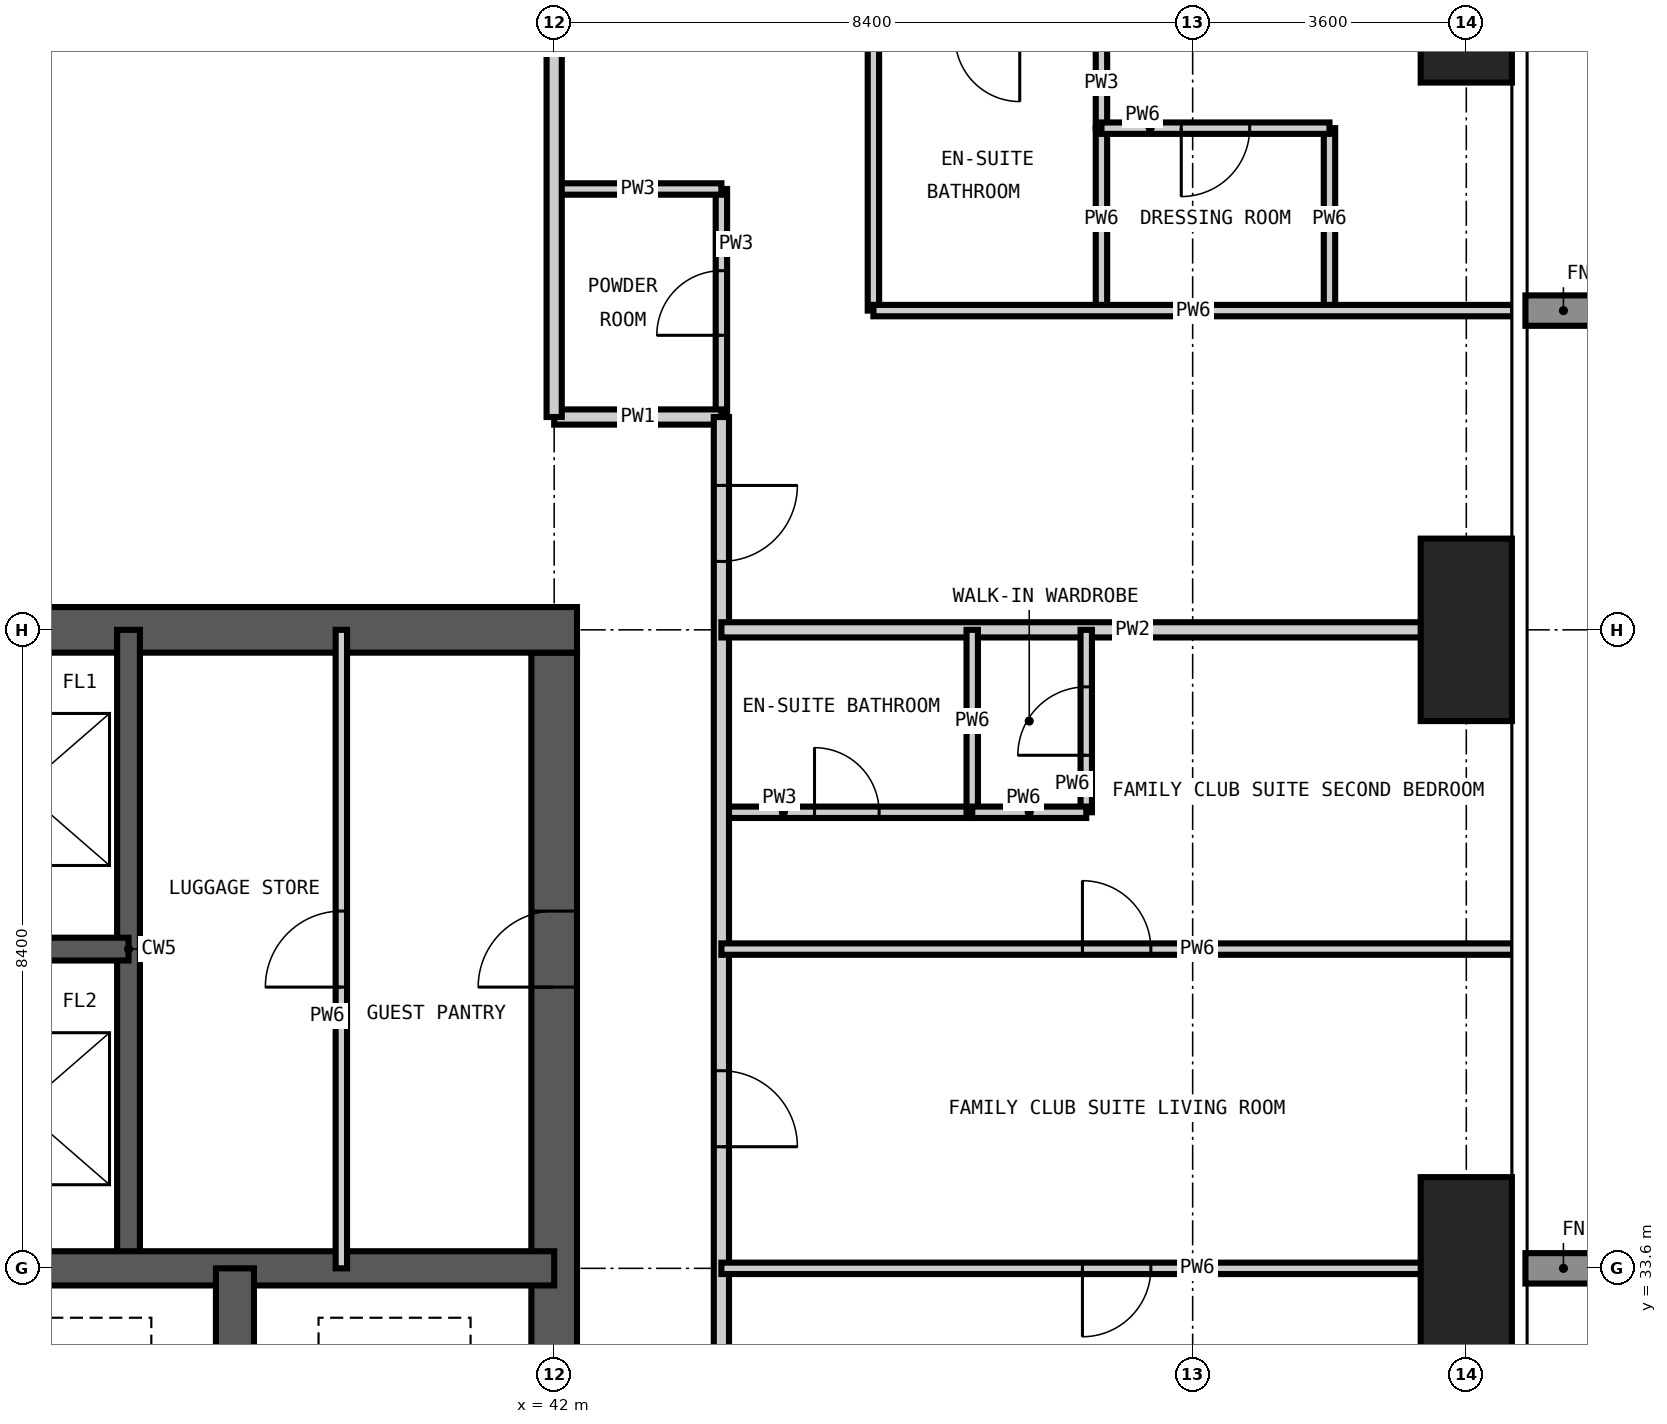
"""IFC4 building model, lengths in metres.
Left out: names, types, materials, properties, quantities, classifications, styles, units other than length and angle.
Written with IfcOpenShell. Run it as: python <this file> out.ifc"""

import sys

from ifc_helpers import new_model, si_unit, direction, frame, frame_2d, origin, origin_2d, place, context, subcontext, project, spatial, rectangle, extrude, element, fill, save


model = new_model("IFC4")
c1 = context("Model", 3, precision=1e-05, world=origin(), true_north=direction((0.0, 1.0)))
c2 = subcontext(c1, "Body", "Model", "MODEL_VIEW")
j1 = project(units=[si_unit("LENGTHUNIT", "METRE"), si_unit("PLANEANGLEUNIT", "RADIAN")], contexts=[c1])
p1 = place(None, origin())
s1 = spatial("IfcSite", under=j1, at=p1, CompositionType="ELEMENT")
p2 = place(p1, origin())
s2 = spatial("IfcBuilding", under=s1, at=p2, CompositionType="ELEMENT")
p3 = place(p2, frame((0.0, 0.0, 198.6)))
s3 = spatial("IfcBuildingStorey", under=s2, at=p3, CompositionType="ELEMENT", Elevation=198.6)
for number, where, z_axis, x_axis in (
    (1, (54.0, 33.6, -0.35), (0.0, 0.0, 1.0), (1.0, 0.0, 0.0)),
    (2, (54.0, 42.0, -0.35), (0.0, 0.0, 1.0), (1.0, 0.0, 0.0)),
    (3, (54.0, 50.4, -0.35), (0.0, 0.0, 1.0), (1.0, 0.0, 0.0)),
):
    element("IfcColumn", number, at=place(p3, frame(where, z_axis=z_axis, x_axis=x_axis)), inside=s3, PredefinedType="COLUMN", context=c2, shape_type="SweptSolid", body=[
        extrude(rectangle(XDim=1.2, YDim=2.4, at=origin_2d()), origin(), (0.0, 0.0, 1.0), 3.6),
    ])
p4 = place(p3, frame((42.0, 17.1, -0.35), z_axis=(0.0, 0.0, 1.0), x_axis=(0.0, 1.0, 0.0)))
e4 = element("IfcWall", 4, at=p4, inside=s3, PredefinedType="SHEAR", context=c2, shape_type="SweptSolid", body=[
    extrude(rectangle(XDim=24.6, YDim=0.6, at=frame_2d((12.3, 0.0))), origin(), (0.0, 0.0, 1.0), 3.6),
])
p5 = place(p4, frame((0.5, 0.0, 0.35)))
e5 = element("IfcOpeningElement", 5, at=p5, cuts=e4, PredefinedType="OPENING", context=c2, shape_type="SweptSolid", body=[
    extrude(rectangle(XDim=1.2, YDim=2.2, at=frame_2d((0.6, 1.1))), frame((0.0, 0.31, 0.0), z_axis=(0.0, -1.0, 0.0), x_axis=(1.0, 0.0, 0.0)), (0.0, 0.0, 1.0), 0.62),
])
p6 = place(p4, frame((11.8, 0.0, 0.35)))
e6 = element("IfcOpeningElement", 6, at=p6, cuts=e4, PredefinedType="OPENING", context=c2, shape_type="SweptSolid", body=[
    extrude(rectangle(XDim=1.0, YDim=2.1, at=frame_2d((0.5, 1.05))), frame((0.0, 0.31, 0.0), z_axis=(0.0, -1.0, 0.0), x_axis=(1.0, 0.0, 0.0)), (0.0, 0.0, 1.0), 0.62),
])
p7 = place(p4, frame((20.2, 0.0, 0.35)))
e7 = element("IfcOpeningElement", 7, at=p7, cuts=e4, PredefinedType="OPENING", context=c2, shape_type="SweptSolid", body=[
    extrude(rectangle(XDim=1.0, YDim=2.1, at=frame_2d((0.5, 1.05))), frame((0.0, 0.31, 0.0), z_axis=(0.0, -1.0, 0.0), x_axis=(1.0, 0.0, 0.0)), (0.0, 0.0, 1.0), 0.62),
])
p8 = place(p3, frame((42.3, 42.0, -0.35), z_axis=(0.0, 0.0, 1.0), x_axis=(-1.0, 0.0, 0.0)))
e8 = element("IfcWall", 8, at=p8, inside=s3, PredefinedType="SHEAR", context=c2, shape_type="SweptSolid", body=[
    extrude(rectangle(XDim=25.8, YDim=0.6, at=frame_2d((12.9, 0.0))), origin(), (0.0, 0.0, 1.0), 3.6),
])
p9 = place(p8, frame((20.8, 0.0, 0.35)))
e9 = element("IfcOpeningElement", 9, at=p9, cuts=e8, PredefinedType="OPENING", context=c2, shape_type="SweptSolid", body=[
    extrude(rectangle(XDim=1.0, YDim=2.1, at=frame_2d((0.5, 1.05))), frame((0.0, 0.31, 0.0), z_axis=(0.0, -1.0, 0.0), x_axis=(1.0, 0.0, 0.0)), (0.0, 0.0, 1.0), 0.62),
])
p10 = place(p8, frame((10.2, 0.0, 0.35)))
e10 = element("IfcOpeningElement", 10, at=p10, cuts=e8, PredefinedType="OPENING", context=c2, shape_type="SweptSolid", body=[
    extrude(rectangle(XDim=1.2, YDim=2.2, at=frame_2d((0.6, 1.1))), frame((0.0, 0.31, 0.0), z_axis=(0.0, -1.0, 0.0), x_axis=(1.0, 0.0, 0.0)), (0.0, 0.0, 1.0), 0.62),
])
p11 = place(p3, frame((36.4, 33.6, -0.35), z_axis=(0.0, 0.0, 1.0), x_axis=(0.0, 1.0, 0.0)))
e11 = element("IfcWall", 11, at=p11, inside=s3, PredefinedType="SHEAR", context=c2, shape_type="SweptSolid", body=[
    extrude(rectangle(XDim=8.4, YDim=0.3, at=frame_2d((4.2, 0.0))), origin(), (0.0, 0.0, 1.0), 3.6),
])
p12 = place(p3, frame((33.6, 37.8, -0.35), z_axis=(0.0, 0.0, 1.0), x_axis=(1.0, 0.0, 0.0)))
e12 = element("IfcWall", 12, at=p12, inside=s3, PredefinedType="SHEAR", context=c2, shape_type="SweptSolid", body=[
    extrude(rectangle(XDim=2.8, YDim=0.3, at=frame_2d((1.4, 0.0))), origin(), (0.0, 0.0, 1.0), 3.6),
])
p13 = place(p3, frame((16.8, 33.6, -0.35), z_axis=(0.0, 0.0, 1.0), x_axis=(1.0, 0.0, 0.0)))
e13 = element("IfcWall", 13, at=p13, inside=s3, PredefinedType="SHEAR", context=c2, shape_type="SweptSolid", body=[
    extrude(rectangle(XDim=25.2, YDim=0.45, at=frame_2d((12.6, 0.0))), origin(), (0.0, 0.0, 1.0), 3.6),
])
p14 = place(p3, frame((37.8, 30.8, -0.35), z_axis=(0.0, 0.0, 1.0), x_axis=(0.0, 1.0, 0.0)))
e14 = element("IfcWall", 14, at=p14, inside=s3, PredefinedType="SHEAR", context=c2, shape_type="SweptSolid", body=[
    extrude(rectangle(XDim=2.8, YDim=0.5, at=frame_2d((1.4, 0.0))), origin(), (0.0, 0.0, 1.0), 3.6),
])
p15 = place(p3, frame((44.2, 44.8, 0.0), z_axis=(0.0, 0.0, 1.0), x_axis=(0.0, 1.0, 0.0)))
e15 = element("IfcWall", 15, at=p15, inside=s3, PredefinedType="PARTITIONING", context=c2, shape_type="SweptSolid", body=[
    extrude(rectangle(XDim=3.0, YDim=0.15, at=frame_2d((1.5, 0.0))), origin(), (0.0, 0.0, 1.0), 3.25),
])
p16 = place(p15, frame((1.075, 0.0, 0.0)))
e16 = element("IfcOpeningElement", 16, at=p16, cuts=e15, PredefinedType="OPENING", context=c2, shape_type="SweptSolid", body=[
    extrude(rectangle(XDim=0.85, YDim=2.1, at=frame_2d((0.425, 1.05))), frame((0.0, 0.085, 0.0), z_axis=(0.0, -1.0, 0.0), x_axis=(1.0, 0.0, 0.0)), (0.0, 0.0, 1.0), 0.17),
])
p17 = place(p3, frame((49.2, 48.6, 0.0), z_axis=(0.0, 0.0, 1.0), x_axis=(0.0, 1.0, 0.0)))
e17 = element("IfcWall", 17, at=p17, inside=s3, PredefinedType="PARTITIONING", context=c2, shape_type="SweptSolid", body=[
    extrude(rectangle(XDim=1.2, YDim=0.15, at=frame_2d((0.6, 0.0))), origin(), (0.0, 0.0, 1.0), 3.25),
])
p18 = place(p3, frame((44.2, 39.6, 0.0), z_axis=(0.0, 0.0, 1.0), x_axis=(1.0, 0.0, 0.0)))
e18 = element("IfcWall", 18, at=p18, inside=s3, PredefinedType="PARTITIONING", context=c2, shape_type="SweptSolid", body=[
    extrude(rectangle(XDim=3.3, YDim=0.15, at=frame_2d((1.65, 0.0))), origin(), (0.0, 0.0, 1.0), 3.25),
])
p19 = place(p18, frame((1.225, 0.0, 0.0)))
e19 = element("IfcOpeningElement", 19, at=p19, cuts=e18, PredefinedType="OPENING", context=c2, shape_type="SweptSolid", body=[
    extrude(rectangle(XDim=0.85, YDim=2.1, at=frame_2d((0.425, 1.05))), frame((0.0, 0.085, 0.0), z_axis=(0.0, -1.0, 0.0), x_axis=(1.0, 0.0, 0.0)), (0.0, 0.0, 1.0), 0.17),
])
p20 = place(p3, frame((42.0, 47.8, 0.0), z_axis=(0.0, 0.0, 1.0), x_axis=(1.0, 0.0, 0.0)))
e20 = element("IfcWall", 20, at=p20, inside=s3, PredefinedType="PARTITIONING", context=c2, shape_type="SweptSolid", body=[
    extrude(rectangle(XDim=2.2, YDim=0.15, at=frame_2d((1.1, 0.0))), origin(), (0.0, 0.0, 1.0), 3.25),
])
p21 = place(p3, frame((42.0, 44.8, 0.0), z_axis=(0.0, 0.0, 1.0), x_axis=(1.0, 0.0, 0.0)))
e21 = element("IfcWall", 21, at=p21, inside=s3, PredefinedType="PARTITIONING", context=c2, shape_type="SweptSolid", body=[
    extrude(rectangle(XDim=2.2, YDim=0.2, at=frame_2d((1.1, 0.0))), origin(), (0.0, 0.0, 1.0), 3.25),
])
p22 = place(p3, frame((42.0, 54.618, 0.0), z_axis=(0.0, 0.0, 1.0), x_axis=(0.0, -1.0, 0.0)))
e22 = element("IfcWall", 22, at=p22, inside=s3, PredefinedType="PARTITIONING", context=c2, shape_type="SweptSolid", body=[
    extrude(rectangle(XDim=9.818, YDim=0.2, at=frame_2d((4.909, 0.0))), origin(), (0.0, 0.0, 1.0), 3.25),
])
p23 = place(p3, frame((44.2, 44.8, 0.0), z_axis=(0.0, 0.0, 1.0), x_axis=(0.0, -1.0, 0.0)))
e23 = element("IfcWall", 23, at=p23, inside=s3, PredefinedType="PARTITIONING", context=c2, shape_type="SweptSolid", body=[
    extrude(rectangle(XDim=31.4, YDim=0.2, at=frame_2d((15.7, 0.0))), origin(), (0.0, 0.0, 1.0), 3.25),
])
p24 = place(p23, frame((21.2, 0.0, 0.0)))
e24 = element("IfcOpeningElement", 24, at=p24, cuts=e23, PredefinedType="OPENING", context=c2, shape_type="SweptSolid", body=[
    extrude(rectangle(XDim=1.0, YDim=2.2, at=frame_2d((0.5, 1.1))), frame((0.0, 0.11, 0.0), z_axis=(0.0, -1.0, 0.0), x_axis=(1.0, 0.0, 0.0)), (0.0, 0.0, 1.0), 0.22),
])
p25 = place(p23, frame((8.6, 0.0, 0.0)))
e25 = element("IfcOpeningElement", 25, at=p25, cuts=e23, PredefinedType="OPENING", context=c2, shape_type="SweptSolid", body=[
    extrude(rectangle(XDim=1.0, YDim=2.2, at=frame_2d((0.5, 1.1))), frame((0.0, 0.11, 0.0), z_axis=(0.0, -1.0, 0.0), x_axis=(1.0, 0.0, 0.0)), (0.0, 0.0, 1.0), 0.22),
])
p26 = place(p23, frame((29.2, 0.0, 0.0)))
e26 = element("IfcOpeningElement", 26, at=p26, cuts=e23, PredefinedType="OPENING", context=c2, shape_type="SweptSolid", body=[
    extrude(rectangle(XDim=1.0, YDim=2.2, at=frame_2d((0.5, 1.1))), frame((0.0, 0.11, 0.0), z_axis=(0.0, -1.0, 0.0), x_axis=(1.0, 0.0, 0.0)), (0.0, 0.0, 1.0), 0.22),
])
p27 = place(p23, frame((0.9, 0.0, 0.0)))
e27 = element("IfcOpeningElement", 27, at=p27, cuts=e23, PredefinedType="OPENING", context=c2, shape_type="SweptSolid", body=[
    extrude(rectangle(XDim=1.0, YDim=2.2, at=frame_2d((0.5, 1.1))), frame((0.0, 0.11, 0.0), z_axis=(0.0, -1.0, 0.0), x_axis=(1.0, 0.0, 0.0)), (0.0, 0.0, 1.0), 0.22),
])
p28 = place(p3, frame((44.2, 42.0, 0.0), z_axis=(0.0, 0.0, 1.0), x_axis=(1.0, 0.0, 0.0)))
e28 = element("IfcWall", 28, at=p28, inside=s3, PredefinedType="PARTITIONING", context=c2, shape_type="SweptSolid", body=[
    extrude(rectangle(XDim=10.418, YDim=0.2, at=frame_2d((5.209, 0.0))), origin(), (0.0, 0.0, 1.0), 3.25),
])
p29 = place(p3, frame((39.2, 33.6, 0.0), z_axis=(0.0, 0.0, 1.0), x_axis=(0.0, 1.0, 0.0)))
e29 = element("IfcWall", 29, at=p29, inside=s3, PredefinedType="PARTITIONING", context=c2, shape_type="SweptSolid", body=[
    extrude(rectangle(XDim=8.4, YDim=0.15, at=frame_2d((4.2, 0.0))), origin(), (0.0, 0.0, 1.0), 3.25),
])
p30 = place(p29, frame((3.7, 0.0, 0.0)))
e30 = element("IfcOpeningElement", 30, at=p30, cuts=e29, PredefinedType="OPENING", context=c2, shape_type="SweptSolid", body=[
    extrude(rectangle(XDim=1.0, YDim=2.1, at=frame_2d((0.5, 1.05))), frame((0.0, 0.085, 0.0), z_axis=(0.0, -1.0, 0.0), x_axis=(1.0, 0.0, 0.0)), (0.0, 0.0, 1.0), 0.17),
])
p31 = place(p3, frame((46.2, 46.2, 0.0), z_axis=(0.0, 0.0, 1.0), x_axis=(0.0, 1.0, 0.0)))
e31 = element("IfcWall", 31, at=p31, inside=s3, PredefinedType="PARTITIONING", context=c2, shape_type="SweptSolid", body=[
    extrude(rectangle(XDim=8.418, YDim=0.15, at=frame_2d((4.209, 0.0))), origin(), (0.0, 0.0, 1.0), 3.25),
])
p32 = place(p31, frame((5.55, 0.0, 0.0)))
e32 = element("IfcOpeningElement", 32, at=p32, cuts=e31, PredefinedType="OPENING", context=c2, shape_type="SweptSolid", body=[
    extrude(rectangle(XDim=0.9, YDim=2.1, at=frame_2d((0.45, 1.05))), frame((0.0, 0.085, 0.0), z_axis=(0.0, -1.0, 0.0), x_axis=(1.0, 0.0, 0.0)), (0.0, 0.0, 1.0), 0.17),
])
p33 = place(p3, frame((47.5, 39.6, 0.0), z_axis=(0.0, 0.0, 1.0), x_axis=(0.0, 1.0, 0.0)))
e33 = element("IfcWall", 33, at=p33, inside=s3, PredefinedType="PARTITIONING", context=c2, shape_type="SweptSolid", body=[
    extrude(rectangle(XDim=2.4, YDim=0.15, at=frame_2d((1.2, 0.0))), origin(), (0.0, 0.0, 1.0), 3.25),
])
p34 = place(p3, frame((49.0, 39.6, 0.0), z_axis=(0.0, 0.0, 1.0), x_axis=(0.0, 1.0, 0.0)))
e34 = element("IfcWall", 34, at=p34, inside=s3, PredefinedType="PARTITIONING", context=c2, shape_type="SweptSolid", body=[
    extrude(rectangle(XDim=2.4, YDim=0.15, at=frame_2d((1.2, 0.0))), origin(), (0.0, 0.0, 1.0), 3.25),
])
p35 = place(p34, frame((0.75, 0.0, 0.0)))
e35 = element("IfcOpeningElement", 35, at=p35, cuts=e34, PredefinedType="OPENING", context=c2, shape_type="SweptSolid", body=[
    extrude(rectangle(XDim=0.9, YDim=2.1, at=frame_2d((0.45, 1.05))), frame((0.0, 0.085, 0.0), z_axis=(0.0, -1.0, 0.0), x_axis=(1.0, 0.0, 0.0)), (0.0, 0.0, 1.0), 0.17),
])
for number, where, z_axis, x_axis in (
    (36, (49.2, 46.2, 0.0), (0.0, 0.0, 1.0), (0.0, 1.0, 0.0)),
    (37, (52.2, 46.2, 0.0), (0.0, 0.0, 1.0), (0.0, 1.0, 0.0)),
):
    element("IfcWall", number, at=place(p3, frame(where, z_axis=z_axis, x_axis=x_axis)), inside=s3, PredefinedType="PARTITIONING", context=c2, shape_type="SweptSolid", body=[
        extrude(rectangle(XDim=2.4, YDim=0.15, at=frame_2d((1.2, 0.0))), origin(), (0.0, 0.0, 1.0), 3.25),
    ])
p36 = place(p3, frame((44.2, 33.6, 0.0), z_axis=(0.0, 0.0, 1.0), x_axis=(1.0, 0.0, 0.0)))
e38 = element("IfcWall", 38, at=p36, inside=s3, PredefinedType="PARTITIONING", context=c2, shape_type="SweptSolid", body=[
    extrude(rectangle(XDim=10.418, YDim=0.15, at=frame_2d((5.209, 0.0))), origin(), (0.0, 0.0, 1.0), 3.25),
])
p37 = place(p36, frame((4.75, 0.0, 0.0)))
e39 = element("IfcOpeningElement", 39, at=p37, cuts=e38, PredefinedType="OPENING", context=c2, shape_type="SweptSolid", body=[
    extrude(rectangle(XDim=0.9, YDim=2.1, at=frame_2d((0.45, 1.05))), frame((0.0, 0.085, 0.0), z_axis=(0.0, -1.0, 0.0), x_axis=(1.0, 0.0, 0.0)), (0.0, 0.0, 1.0), 0.17),
])
p38 = place(p3, frame((44.2, 37.8, 0.0), z_axis=(0.0, 0.0, 1.0), x_axis=(1.0, 0.0, 0.0)))
e40 = element("IfcWall", 40, at=p38, inside=s3, PredefinedType="PARTITIONING", context=c2, shape_type="SweptSolid", body=[
    extrude(rectangle(XDim=10.418, YDim=0.15, at=frame_2d((5.209, 0.0))), origin(), (0.0, 0.0, 1.0), 3.25),
])
p39 = place(p38, frame((4.75, 0.0, 0.0)))
e41 = element("IfcOpeningElement", 41, at=p39, cuts=e40, PredefinedType="OPENING", context=c2, shape_type="SweptSolid", body=[
    extrude(rectangle(XDim=0.9, YDim=2.1, at=frame_2d((0.45, 1.05))), frame((0.0, 0.085, 0.0), z_axis=(0.0, -1.0, 0.0), x_axis=(1.0, 0.0, 0.0)), (0.0, 0.0, 1.0), 0.17),
])
p40 = place(p3, frame((47.5, 39.6, 0.0), z_axis=(0.0, 0.0, 1.0), x_axis=(1.0, 0.0, 0.0)))
e42 = element("IfcWall", 42, at=p40, inside=s3, PredefinedType="PARTITIONING", context=c2, shape_type="SweptSolid", body=[
    extrude(rectangle(XDim=1.5, YDim=0.15, at=frame_2d((0.75, 0.0))), origin(), (0.0, 0.0, 1.0), 3.25),
])
p41 = place(p3, frame((46.2, 46.2, 0.0), z_axis=(0.0, 0.0, 1.0), x_axis=(1.0, 0.0, 0.0)))
e43 = element("IfcWall", 43, at=p41, inside=s3, PredefinedType="PARTITIONING", context=c2, shape_type="SweptSolid", body=[
    extrude(rectangle(XDim=8.418, YDim=0.15, at=frame_2d((4.209, 0.0))), origin(), (0.0, 0.0, 1.0), 3.25),
])
p42 = place(p3, frame((49.2, 48.6, 0.0), z_axis=(0.0, 0.0, 1.0), x_axis=(1.0, 0.0, 0.0)))
e44 = element("IfcWall", 44, at=p42, inside=s3, PredefinedType="PARTITIONING", context=c2, shape_type="SweptSolid", body=[
    extrude(rectangle(XDim=3.0, YDim=0.15, at=frame_2d((1.5, 0.0))), origin(), (0.0, 0.0, 1.0), 3.25),
])
p43 = place(p42, frame((1.05, 0.0, 0.0)))
e45 = element("IfcOpeningElement", 45, at=p43, cuts=e44, PredefinedType="OPENING", context=c2, shape_type="SweptSolid", body=[
    extrude(rectangle(XDim=0.9, YDim=2.1, at=frame_2d((0.45, 1.05))), frame((0.0, 0.085, 0.0), z_axis=(0.0, -1.0, 0.0), x_axis=(1.0, 0.0, 0.0)), (0.0, 0.0, 1.0), 0.17),
])
p44 = place(p25, origin())
e46 = element("IfcDoor", 46, at=p44, inside=s3, OperationType="SINGLE_SWING_RIGHT", PredefinedType="DOOR", context=c2, shape_type="SweptSolid", body=[
    extrude(rectangle(XDim=1.0, YDim=2.2, at=frame_2d((0.5, 1.1))), frame((0.0, 0.025, 0.0), z_axis=(0.0, -1.0, 0.0), x_axis=(1.0, 0.0, 0.0)), (0.0, 0.0, 1.0), 0.05),
])
fill(e25, e46)
p45 = place(p37, frame((0.9, 0.0, 0.0), z_axis=(0.0, 0.0, 1.0), x_axis=(-1.0, 0.0, 0.0)))
e47 = element("IfcDoor", 47, at=p45, inside=s3, OperationType="SINGLE_SWING_RIGHT", PredefinedType="DOOR", context=c2, shape_type="SweptSolid", body=[
    extrude(rectangle(XDim=0.9, YDim=2.1, at=frame_2d((0.45, 1.05))), frame((0.0, 0.025, 0.0), z_axis=(0.0, -1.0, 0.0), x_axis=(1.0, 0.0, 0.0)), (0.0, 0.0, 1.0), 0.05),
])
fill(e39, e47)
p46 = place(p39, origin())
e48 = element("IfcDoor", 48, at=p46, inside=s3, OperationType="SINGLE_SWING_LEFT", PredefinedType="DOOR", context=c2, shape_type="SweptSolid", body=[
    extrude(rectangle(XDim=0.9, YDim=2.1, at=frame_2d((0.45, 1.05))), frame((0.0, 0.025, 0.0), z_axis=(0.0, -1.0, 0.0), x_axis=(1.0, 0.0, 0.0)), (0.0, 0.0, 1.0), 0.05),
])
fill(e41, e48)
p47 = place(p19, origin())
e49 = element("IfcDoor", 49, at=p47, inside=s3, OperationType="SINGLE_SWING_LEFT", PredefinedType="DOOR", context=c2, shape_type="SweptSolid", body=[
    extrude(rectangle(XDim=0.85, YDim=2.1, at=frame_2d((0.425, 1.05))), frame((0.0, 0.025, 0.0), z_axis=(0.0, -1.0, 0.0), x_axis=(1.0, 0.0, 0.0)), (0.0, 0.0, 1.0), 0.05),
])
fill(e19, e49)
p48 = place(p35, origin())
e50 = element("IfcDoor", 50, at=p48, inside=s3, OperationType="SINGLE_SWING_LEFT", PredefinedType="DOOR", context=c2, shape_type="SweptSolid", body=[
    extrude(rectangle(XDim=0.9, YDim=2.1, at=frame_2d((0.45, 1.05))), frame((0.0, 0.025, 0.0), z_axis=(0.0, -1.0, 0.0), x_axis=(1.0, 0.0, 0.0)), (0.0, 0.0, 1.0), 0.05),
])
fill(e35, e50)
p49 = place(p27, origin())
e51 = element("IfcDoor", 51, at=p49, inside=s3, OperationType="SINGLE_SWING_LEFT", PredefinedType="DOOR", context=c2, shape_type="SweptSolid", body=[
    extrude(rectangle(XDim=1.0, YDim=2.2, at=frame_2d((0.5, 1.1))), frame((0.0, 0.025, 0.0), z_axis=(0.0, -1.0, 0.0), x_axis=(1.0, 0.0, 0.0)), (0.0, 0.0, 1.0), 0.05),
])
fill(e27, e51)
p50 = place(p16, origin())
e52 = element("IfcDoor", 52, at=p50, inside=s3, OperationType="SINGLE_SWING_LEFT", PredefinedType="DOOR", context=c2, shape_type="SweptSolid", body=[
    extrude(rectangle(XDim=0.85, YDim=2.1, at=frame_2d((0.425, 1.05))), frame((0.0, 0.025, 0.0), z_axis=(0.0, -1.0, 0.0), x_axis=(1.0, 0.0, 0.0)), (0.0, 0.0, 1.0), 0.05),
])
fill(e16, e52)
p51 = place(p43, frame((0.9, 0.0, 0.0), z_axis=(0.0, 0.0, 1.0), x_axis=(-1.0, 0.0, 0.0)))
e53 = element("IfcDoor", 53, at=p51, inside=s3, OperationType="SINGLE_SWING_RIGHT", PredefinedType="DOOR", context=c2, shape_type="SweptSolid", body=[
    extrude(rectangle(XDim=0.9, YDim=2.1, at=frame_2d((0.45, 1.05))), frame((0.0, 0.025, 0.0), z_axis=(0.0, -1.0, 0.0), x_axis=(1.0, 0.0, 0.0)), (0.0, 0.0, 1.0), 0.05),
])
fill(e45, e53)
p52 = place(p7, origin())
e54 = element("IfcDoor", 54, at=p52, inside=s3, OperationType="SINGLE_SWING_LEFT", PredefinedType="DOOR", context=c2, shape_type="SweptSolid", body=[
    extrude(rectangle(XDim=1.0, YDim=2.1, at=frame_2d((0.5, 1.05))), frame((0.0, 0.025, 0.0), z_axis=(0.0, -1.0, 0.0), x_axis=(1.0, 0.0, 0.0)), (0.0, 0.0, 1.0), 0.05),
])
fill(e7, e54)
p53 = place(p30, origin())
e55 = element("IfcDoor", 55, at=p53, inside=s3, OperationType="SINGLE_SWING_LEFT", PredefinedType="DOOR", context=c2, shape_type="SweptSolid", body=[
    extrude(rectangle(XDim=1.0, YDim=2.1, at=frame_2d((0.5, 1.05))), frame((0.0, 0.025, 0.0), z_axis=(0.0, -1.0, 0.0), x_axis=(1.0, 0.0, 0.0)), (0.0, 0.0, 1.0), 0.05),
])
fill(e30, e55)
save(model, sys.argv[1])
